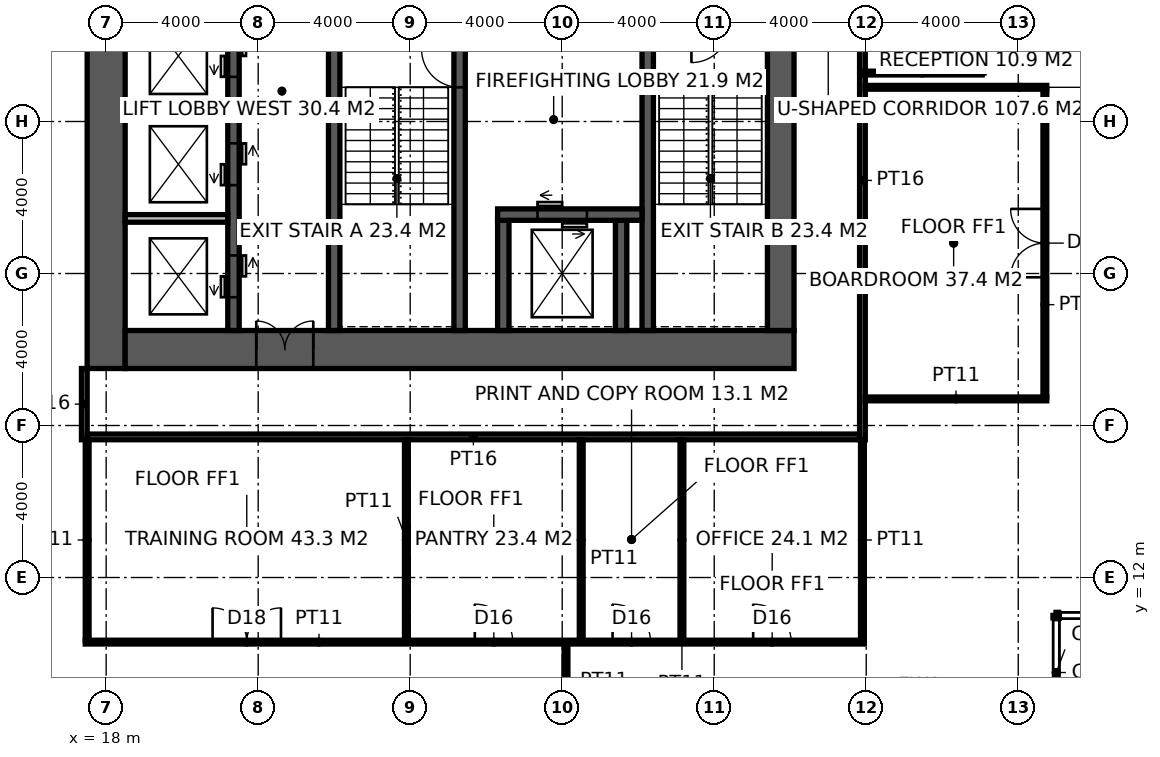
"""IFC4 building model, lengths in metres.
Left out: names, types, materials, properties, quantities, classifications, styles, units other than length and angle.
Written with IfcOpenShell. Run it as: python <this file> out.ifc"""

import sys

from ifc_helpers import new_model, si_unit, direction, frame, frame_2d, origin, place, context, subcontext, project, spatial, rectangle, extrude, element, fill, save


model = new_model("IFC4")
c1 = context("Model", 3, precision=1e-05, world=origin(), true_north=direction((0.0, 1.0)))
c2 = subcontext(c1, "Body", "Model", "MODEL_VIEW")
j1 = project(units=[si_unit("LENGTHUNIT", "METRE"), si_unit("PLANEANGLEUNIT", "RADIAN")], contexts=[c1])
p1 = place(None, origin())
s1 = spatial("IfcSite", under=j1, at=p1, CompositionType="ELEMENT")
p2 = place(p1, origin())
s2 = spatial("IfcBuilding", under=s1, at=p2, CompositionType="ELEMENT")
p3 = place(p2, frame((0.0, 0.0, 199.8)))
s3 = spatial("IfcBuildingStorey", under=s2, at=p3, CompositionType="ELEMENT", Elevation=199.8)
p4 = place(p3, frame((18.0, 17.5, -0.15), z_axis=(0.0, 0.0, 1.0), x_axis=(0.0, 1.0, 0.0)))
e1 = element("IfcWall", 1, at=p4, inside=s3, PredefinedType="SHEAR", context=c2, shape_type="SweptSolid", body=[
    extrude(rectangle(XDim=19.0, YDim=1.0, at=frame_2d((9.5, 0.0))), origin(), (0.0, 0.0, 1.0), 4.0),
])
p5 = place(p3, frame((18.5, 18.0, -0.15), z_axis=(0.0, 0.0, 1.0), x_axis=(1.0, 0.0, 0.0)))
e2 = element("IfcWall", 2, at=p5, inside=s3, PredefinedType="SHEAR", context=c2, shape_type="SweptSolid", body=[
    extrude(rectangle(XDim=17.6, YDim=1.0, at=frame_2d((8.8, 0.0))), origin(), (0.0, 0.0, 1.0), 4.0),
])
p6 = place(p5, frame((3.45, 0.0, 0.15)))
e3 = element("IfcOpeningElement", 3, at=p6, cuts=e2, PredefinedType="OPENING", context=c2, shape_type="SweptSolid", body=[
    extrude(rectangle(XDim=1.5, YDim=2.4, at=frame_2d((0.75, 1.2))), frame((0.0, 0.51, 0.0), z_axis=(0.0, -1.0, 0.0), x_axis=(1.0, 0.0, 0.0)), (0.0, 0.0, 1.0), 1.02),
])
p7 = place(p3, frame((35.75, 18.5, -0.15), z_axis=(0.0, 0.0, 1.0), x_axis=(0.0, 1.0, 0.0)))
e4 = element("IfcWall", 4, at=p7, inside=s3, PredefinedType="SHEAR", context=c2, shape_type="SweptSolid", body=[
    extrude(rectangle(XDim=17.0, YDim=0.7, at=frame_2d((8.5, 0.0))), origin(), (0.0, 0.0, 1.0), 4.0),
])
p8 = place(p7, frame((9.85, 0.0, 0.15)))
e5 = element("IfcOpeningElement", 5, at=p8, cuts=e4, PredefinedType="OPENING", context=c2, shape_type="SweptSolid", body=[
    extrude(rectangle(XDim=1.0, YDim=2.2, at=frame_2d((0.5, 1.1))), frame((0.0, 0.36, 0.0), z_axis=(0.0, -1.0, 0.0), x_axis=(1.0, 0.0, 0.0)), (0.0, 0.0, 1.0), 0.72),
])
p9 = place(p3, frame((24.0, 18.5, -0.15), z_axis=(0.0, 0.0, 1.0), x_axis=(0.0, 1.0, 0.0)))
e6 = element("IfcWall", 6, at=p9, inside=s3, PredefinedType="SHEAR", context=c2, shape_type="SweptSolid", body=[
    extrude(rectangle(XDim=17.0, YDim=0.3, at=frame_2d((8.5, 0.0))), origin(), (0.0, 0.0, 1.0), 4.0),
])
p10 = place(p9, frame((9.6, 0.0, 0.15)))
e7 = element("IfcOpeningElement", 7, at=p10, cuts=e6, PredefinedType="OPENING", context=c2, shape_type="SweptSolid", body=[
    extrude(rectangle(XDim=1.5, YDim=2.4, at=frame_2d((0.75, 1.2))), frame((0.0, 0.16, 0.0), z_axis=(0.0, -1.0, 0.0), x_axis=(1.0, 0.0, 0.0)), (0.0, 0.0, 1.0), 0.32),
])
p11 = place(p3, frame((27.3, 18.5, -0.15), z_axis=(0.0, 0.0, 1.0), x_axis=(0.0, 1.0, 0.0)))
e8 = element("IfcWall", 8, at=p11, inside=s3, PredefinedType="SHEAR", context=c2, shape_type="SweptSolid", body=[
    extrude(rectangle(XDim=7.9, YDim=0.3, at=frame_2d((3.95, 0.0))), origin(), (0.0, 0.0, 1.0), 4.0),
])
p12 = place(p11, frame((6.4, 0.0, 0.15)))
e9 = element("IfcOpeningElement", 9, at=p12, cuts=e8, PredefinedType="OPENING", context=c2, shape_type="SweptSolid", body=[
    extrude(rectangle(XDim=1.0, YDim=2.2, at=frame_2d((0.5, 1.1))), frame((0.0, 0.16, 0.0), z_axis=(0.0, -1.0, 0.0), x_axis=(1.0, 0.0, 0.0)), (0.0, 0.0, 1.0), 0.32),
])
p13 = place(p3, frame((32.25, 18.5, -0.15), z_axis=(0.0, 0.0, 1.0), x_axis=(0.0, 1.0, 0.0)))
e10 = element("IfcWall", 10, at=p13, inside=s3, PredefinedType="SHEAR", context=c2, shape_type="SweptSolid", body=[
    extrude(rectangle(XDim=7.9, YDim=0.3, at=frame_2d((3.95, 0.0))), origin(), (0.0, 0.0, 1.0), 4.0),
])
for number, where, z_axis, x_axis in (
    (11, (28.45, 18.5, -0.15), (0.0, 0.0, 1.0), (0.0, 1.0, 0.0)),
    (12, (31.55, 18.5, -0.15), (0.0, 0.0, 1.0), (0.0, 1.0, 0.0)),
):
    element("IfcWall", number, at=place(p3, frame(where, z_axis=z_axis, x_axis=x_axis)), inside=s3, PredefinedType="SHEAR", context=c2, shape_type="SweptSolid", body=[
        extrude(rectangle(XDim=2.9, YDim=0.3, at=frame_2d((1.45, 0.0))), origin(), (0.0, 0.0, 1.0), 4.0),
    ])
p14 = place(p3, frame((28.3, 21.55, -0.15), z_axis=(0.0, 0.0, 1.0), x_axis=(1.0, 0.0, 0.0)))
e13 = element("IfcWall", 13, at=p14, inside=s3, PredefinedType="SHEAR", context=c2, shape_type="SweptSolid", body=[
    extrude(rectangle(XDim=3.8, YDim=0.3, at=frame_2d((1.9, 0.0))), origin(), (0.0, 0.0, 1.0), 4.0),
])
p15 = place(p14, frame((1.05, 0.0, 0.15)))
e14 = element("IfcOpeningElement", 14, at=p15, cuts=e13, PredefinedType="OPENING", context=c2, shape_type="SweptSolid", body=[
    extrude(rectangle(XDim=1.3, YDim=2.4, at=frame_2d((0.65, 1.2))), frame((0.0, 0.16, 0.0), z_axis=(0.0, -1.0, 0.0), x_axis=(1.0, 0.0, 0.0)), (0.0, 0.0, 1.0), 0.32),
])
p16 = place(p3, frame((21.35, 18.5, -0.15), z_axis=(0.0, 0.0, 1.0), x_axis=(0.0, 1.0, 0.0)))
e15 = element("IfcWall", 15, at=p16, inside=s3, PredefinedType="SHEAR", context=c2, shape_type="SweptSolid", body=[
    extrude(rectangle(XDim=12.5, YDim=0.3, at=frame_2d((6.25, 0.0))), origin(), (0.0, 0.0, 1.0), 4.0),
])
p17 = place(p16, frame((0.875, 0.0, 0.15)))
e16 = element("IfcOpeningElement", 16, at=p17, cuts=e15, PredefinedType="OPENING", context=c2, shape_type="SweptSolid", body=[
    extrude(rectangle(XDim=1.1, YDim=2.2, at=frame_2d((0.55, 1.1))), frame((0.0, 0.16, 0.0), z_axis=(0.0, -1.0, 0.0), x_axis=(1.0, 0.0, 0.0)), (0.0, 0.0, 1.0), 0.32),
])
p18 = place(p16, frame((3.825, 0.0, 0.15)))
e17 = element("IfcOpeningElement", 17, at=p18, cuts=e15, PredefinedType="OPENING", context=c2, shape_type="SweptSolid", body=[
    extrude(rectangle(XDim=1.1, YDim=2.2, at=frame_2d((0.55, 1.1))), frame((0.0, 0.16, 0.0), z_axis=(0.0, -1.0, 0.0), x_axis=(1.0, 0.0, 0.0)), (0.0, 0.0, 1.0), 0.32),
])
p19 = place(p16, frame((6.675, 0.0, 0.15)))
e18 = element("IfcOpeningElement", 18, at=p19, cuts=e15, PredefinedType="OPENING", context=c2, shape_type="SweptSolid", body=[
    extrude(rectangle(XDim=1.1, YDim=2.2, at=frame_2d((0.55, 1.1))), frame((0.0, 0.16, 0.0), z_axis=(0.0, -1.0, 0.0), x_axis=(1.0, 0.0, 0.0)), (0.0, 0.0, 1.0), 0.32),
])
p20 = place(p16, frame((9.575, 0.0, 0.15)))
e19 = element("IfcOpeningElement", 19, at=p20, cuts=e15, PredefinedType="OPENING", context=c2, shape_type="SweptSolid", body=[
    extrude(rectangle(XDim=1.1, YDim=2.2, at=frame_2d((0.55, 1.1))), frame((0.0, 0.16, 0.0), z_axis=(0.0, -1.0, 0.0), x_axis=(1.0, 0.0, 0.0)), (0.0, 0.0, 1.0), 0.32),
])
for number, where, z_axis, x_axis in (
    (20, (18.5, 21.45, -0.15), (0.0, 0.0, 1.0), (1.0, 0.0, 0.0)),
    (21, (18.5, 24.3, -0.15), (0.0, 0.0, 1.0), (1.0, 0.0, 0.0)),
):
    element("IfcWall", number, at=place(p3, frame(where, z_axis=z_axis, x_axis=x_axis)), inside=s3, PredefinedType="SOLIDWALL", context=c2, shape_type="SweptSolid", body=[
        extrude(rectangle(XDim=2.7, YDim=0.2, at=frame_2d((1.35, 0.0))), origin(), (0.0, 0.0, 1.0), 4.0),
    ])
p21 = place(p3, frame((17.425, 15.625, 0.0), z_axis=(0.0, 0.0, 1.0), x_axis=(0.0, 1.0, 0.0)))
e22 = element("IfcWall", 22, at=p21, inside=s3, PredefinedType="PARTITIONING", context=c2, shape_type="SweptSolid", body=[
    extrude(rectangle(XDim=1.875, YDim=0.15, at=frame_2d((0.938, 0.0))), origin(), (0.0, 0.0, 1.0), 3.85),
])
p22 = place(p3, frame((37.9, 15.625, 0.0), z_axis=(0.0, 0.0, 1.0), x_axis=(0.0, 1.0, 0.0)))
e23 = element("IfcWall", 23, at=p22, inside=s3, PredefinedType="PARTITIONING", context=c2, shape_type="SweptSolid", body=[
    extrude(rectangle(XDim=22.75, YDim=0.15, at=frame_2d((11.375, 0.0))), origin(), (0.0, 0.0, 1.0), 2.85),
])
p23 = place(p22, frame((10.475, 0.0, 0.0)))
e24 = element("IfcOpeningElement", 24, at=p23, cuts=e23, PredefinedType="OPENING", context=c2, shape_type="SweptSolid", body=[
    extrude(rectangle(XDim=1.8, YDim=2.4, at=frame_2d((0.9, 1.2))), frame((0.0, 0.085, 0.0), z_axis=(0.0, -1.0, 0.0), x_axis=(1.0, 0.0, 0.0)), (0.0, 0.0, 1.0), 0.17),
])
p24 = place(p3, frame((17.5, 15.7, 0.0), z_axis=(0.0, 0.0, 1.0), x_axis=(1.0, 0.0, 0.0)))
e25 = element("IfcWall", 25, at=p24, inside=s3, PredefinedType="PARTITIONING", context=c2, shape_type="SweptSolid", body=[
    extrude(rectangle(XDim=20.325, YDim=0.15, at=frame_2d((10.163, 0.0))), origin(), (0.0, 0.0, 1.0), 3.85),
])
p25 = place(p3, frame((17.45, 10.3, 0.0), z_axis=(0.0, 0.0, 1.0), x_axis=(1.0, 0.0, 0.0)))
e26 = element("IfcWall", 26, at=p25, inside=s3, PredefinedType="PARTITIONING", context=c2, shape_type="SweptSolid", body=[
    extrude(rectangle(XDim=20.5, YDim=0.1, at=frame_2d((10.25, 0.0))), origin(), (0.0, 0.0, 1.0), 3.85),
])
p26 = place(p25, frame((3.35, 0.0, 0.0)))
e27 = element("IfcOpeningElement", 27, at=p26, cuts=e26, PredefinedType="OPENING", context=c2, shape_type="SweptSolid", body=[
    extrude(rectangle(XDim=1.8, YDim=2.4, at=frame_2d((0.9, 1.2))), frame((0.0, 0.06, 0.0), z_axis=(0.0, -1.0, 0.0), x_axis=(1.0, 0.0, 0.0)), (0.0, 0.0, 1.0), 0.12),
])
p27 = place(p25, frame((10.25, 0.0, 0.0)))
e28 = element("IfcOpeningElement", 28, at=p27, cuts=e26, PredefinedType="OPENING", context=c2, shape_type="SweptSolid", body=[
    extrude(rectangle(XDim=1.0, YDim=2.2, at=frame_2d((0.5, 1.1))), frame((0.0, 0.06, 0.0), z_axis=(0.0, -1.0, 0.0), x_axis=(1.0, 0.0, 0.0)), (0.0, 0.0, 1.0), 0.12),
])
p28 = place(p25, frame((13.875, 0.0, 0.0)))
e29 = element("IfcOpeningElement", 29, at=p28, cuts=e26, PredefinedType="OPENING", context=c2, shape_type="SweptSolid", body=[
    extrude(rectangle(XDim=1.0, YDim=2.2, at=frame_2d((0.5, 1.1))), frame((0.0, 0.06, 0.0), z_axis=(0.0, -1.0, 0.0), x_axis=(1.0, 0.0, 0.0)), (0.0, 0.0, 1.0), 0.12),
])
p29 = place(p25, frame((17.575, 0.0, 0.0)))
e30 = element("IfcOpeningElement", 30, at=p29, cuts=e26, PredefinedType="OPENING", context=c2, shape_type="SweptSolid", body=[
    extrude(rectangle(XDim=1.0, YDim=2.2, at=frame_2d((0.5, 1.1))), frame((0.0, 0.06, 0.0), z_axis=(0.0, -1.0, 0.0), x_axis=(1.0, 0.0, 0.0)), (0.0, 0.0, 1.0), 0.12),
])
for number, where, z_axis, x_axis in (
    (31, (37.975, 16.7, 0.0), (0.0, 0.0, 1.0), (1.0, 0.0, 0.0)),
    (32, (37.975, 24.9, 0.0), (0.0, 0.0, 1.0), (1.0, 0.0, 0.0)),
):
    element("IfcWall", number, at=place(p3, frame(where, z_axis=z_axis, x_axis=x_axis)), inside=s3, PredefinedType="PARTITIONING", context=c2, shape_type="SweptSolid", body=[
        extrude(rectangle(XDim=4.775, YDim=0.1, at=frame_2d((2.387, 0.0))), origin(), (0.0, 0.0, 1.0), 3.85),
    ])
p30 = place(p3, frame((17.5, 10.35, 0.0), z_axis=(0.0, 0.0, 1.0), x_axis=(0.0, 1.0, 0.0)))
e33 = element("IfcWall", 33, at=p30, inside=s3, PredefinedType="PARTITIONING", context=c2, shape_type="SweptSolid", body=[
    extrude(rectangle(XDim=5.275, YDim=0.1, at=frame_2d((2.637, 0.0))), origin(), (0.0, 0.0, 1.0), 3.85),
])
for number, where, z_axis, x_axis in (
    (34, (25.9, 10.35, 0.0), (0.0, 0.0, 1.0), (0.0, 1.0, 0.0)),
    (35, (30.5, 10.35, 0.0), (0.0, 0.0, 1.0), (0.0, 1.0, 0.0)),
):
    element("IfcWall", number, at=place(p3, frame(where, z_axis=z_axis, x_axis=x_axis)), inside=s3, PredefinedType="PARTITIONING", context=c2, shape_type="SweptSolid", body=[
        extrude(rectangle(XDim=5.275, YDim=0.1, at=frame_2d((2.637, 0.0))), origin(), (0.0, 0.0, 1.0), 2.65),
    ])
p31 = place(p3, frame((33.15, 10.35, 0.0), z_axis=(0.0, 0.0, 1.0), x_axis=(0.0, 1.0, 0.0)))
e36 = element("IfcWall", 36, at=p31, inside=s3, PredefinedType="PARTITIONING", context=c2, shape_type="SweptSolid", body=[
    extrude(rectangle(XDim=5.275, YDim=0.1, at=frame_2d((2.637, 0.0))), origin(), (0.0, 0.0, 1.0), 3.85),
])
p32 = place(p3, frame((37.9, 10.35, 0.0), z_axis=(0.0, 0.0, 1.0), x_axis=(0.0, 1.0, 0.0)))
e37 = element("IfcWall", 37, at=p32, inside=s3, PredefinedType="PARTITIONING", context=c2, shape_type="SweptSolid", body=[
    extrude(rectangle(XDim=5.275, YDim=0.1, at=frame_2d((2.637, 0.0))), origin(), (0.0, 0.0, 1.0), 2.95),
])
p33 = place(p3, frame((42.7, 16.75, 0.0), z_axis=(0.0, 0.0, 1.0), x_axis=(0.0, 1.0, 0.0)))
e38 = element("IfcWall", 38, at=p33, inside=s3, PredefinedType="PARTITIONING", context=c2, shape_type="SweptSolid", body=[
    extrude(rectangle(XDim=8.1, YDim=0.1, at=frame_2d((4.05, 0.0))), origin(), (0.0, 0.0, 1.0), 3.85),
])
p34 = place(p33, frame((3.15, 0.0, 0.0)))
e39 = element("IfcOpeningElement", 39, at=p34, cuts=e38, PredefinedType="OPENING", context=c2, shape_type="SweptSolid", body=[
    extrude(rectangle(XDim=1.8, YDim=2.4, at=frame_2d((0.9, 1.2))), frame((0.0, 0.06, 0.0), z_axis=(0.0, -1.0, 0.0), x_axis=(1.0, 0.0, 0.0)), (0.0, 0.0, 1.0), 0.12),
])
p35 = place(p3, frame((30.1, 10.25, 0.0), z_axis=(0.0, 0.0, 1.0), x_axis=(0.0, -1.0, 0.0)))
e40 = element("IfcWall", 40, at=p35, inside=s3, PredefinedType="PARTITIONING", context=c2, shape_type="SweptSolid", body=[
    extrude(rectangle(XDim=1.95, YDim=0.1, at=frame_2d((0.975, 0.0))), origin(), (0.0, 0.0, 1.0), 2.65),
])
p36 = place(p3, frame((37.9, 25.275, 0.0), z_axis=(0.0, 0.0, 1.0), x_axis=(1.0, 0.0, 0.0)))
e41 = element("IfcWall", 41, at=p36, inside=s3, PredefinedType="PARTITIONING", context=c2, shape_type="SweptSolid", body=[
    extrude(rectangle(XDim=3.15, YDim=0.1, at=frame_2d((1.575, 0.0))), origin(), (0.0, 0.0, 1.0), 3.85),
])
p37 = place(p3, frame((41.05, 25.275, 0.0), z_axis=(0.0, 0.0, 1.0), x_axis=(0.0, 1.0, 0.0)))
e42 = element("IfcWall", 42, at=p37, inside=s3, PredefinedType="PARTITIONING", context=c2, shape_type="SweptSolid", body=[
    extrude(rectangle(XDim=3.45, YDim=0.1, at=frame_2d((1.725, 0.0))), origin(), (0.0, 0.0, 1.0), 3.85),
])
p38 = place(p37, frame((1.225, 0.0, 0.0)))
e43 = element("IfcOpeningElement", 43, at=p38, cuts=e42, PredefinedType="OPENING", context=c2, shape_type="SweptSolid", body=[
    extrude(rectangle(XDim=1.0, YDim=2.2, at=frame_2d((0.5, 1.1))), frame((0.0, 0.06, 0.0), z_axis=(0.0, -1.0, 0.0), x_axis=(1.0, 0.0, 0.0)), (0.0, 0.0, 1.0), 0.12),
])
p39 = place(p12, origin())
e44 = element("IfcDoor", 44, at=p39, inside=s3, OperationType="SINGLE_SWING_RIGHT", PredefinedType="DOOR", context=c2, shape_type="SweptSolid", body=[
    extrude(rectangle(XDim=1.0, YDim=2.2, at=frame_2d((0.5, 1.1))), frame((0.0, 0.025, 0.0), z_axis=(0.0, -1.0, 0.0), x_axis=(1.0, 0.0, 0.0)), (0.0, 0.0, 1.0), 0.05),
])
fill(e9, e44)
p40 = place(p6, origin())
e45 = element("IfcDoor", 45, at=p40, inside=s3, OperationType="DOUBLE_DOOR_DOUBLE_SWING", PredefinedType="DOOR", context=c2, shape_type="SweptSolid", body=[
    extrude(rectangle(XDim=1.5, YDim=2.4, at=frame_2d((0.75, 1.2))), frame((0.0, 0.025, 0.0), z_axis=(0.0, -1.0, 0.0), x_axis=(1.0, 0.0, 0.0)), (0.0, 0.0, 1.0), 0.05),
])
fill(e3, e45)
p41 = place(p26, origin())
e46 = element("IfcDoor", 46, at=p41, inside=s3, OperationType="DOUBLE_DOOR_DOUBLE_SWING", PredefinedType="DOOR", context=c2, shape_type="SweptSolid", body=[
    extrude(rectangle(XDim=1.8, YDim=2.4, at=frame_2d((0.9, 1.2))), frame((0.0, 0.025, 0.0), z_axis=(0.0, -1.0, 0.0), x_axis=(1.0, 0.0, 0.0)), (0.0, 0.0, 1.0), 0.05),
])
fill(e27, e46)
p42 = place(p27, origin())
e47 = element("IfcDoor", 47, at=p42, inside=s3, OperationType="SINGLE_SWING_LEFT", PredefinedType="DOOR", context=c2, shape_type="SweptSolid", body=[
    extrude(rectangle(XDim=1.0, YDim=2.2, at=frame_2d((0.5, 1.1))), frame((0.0, 0.025, 0.0), z_axis=(0.0, -1.0, 0.0), x_axis=(1.0, 0.0, 0.0)), (0.0, 0.0, 1.0), 0.05),
])
fill(e28, e47)
p43 = place(p28, origin())
e48 = element("IfcDoor", 48, at=p43, inside=s3, OperationType="SINGLE_SWING_LEFT", PredefinedType="DOOR", context=c2, shape_type="SweptSolid", body=[
    extrude(rectangle(XDim=1.0, YDim=2.2, at=frame_2d((0.5, 1.1))), frame((0.0, 0.025, 0.0), z_axis=(0.0, -1.0, 0.0), x_axis=(1.0, 0.0, 0.0)), (0.0, 0.0, 1.0), 0.05),
])
fill(e29, e48)
p44 = place(p29, origin())
e49 = element("IfcDoor", 49, at=p44, inside=s3, OperationType="SINGLE_SWING_LEFT", PredefinedType="DOOR", context=c2, shape_type="SweptSolid", body=[
    extrude(rectangle(XDim=1.0, YDim=2.2, at=frame_2d((0.5, 1.1))), frame((0.0, 0.025, 0.0), z_axis=(0.0, -1.0, 0.0), x_axis=(1.0, 0.0, 0.0)), (0.0, 0.0, 1.0), 0.05),
])
fill(e30, e49)
p45 = place(p34, origin())
e50 = element("IfcDoor", 50, at=p45, inside=s3, OperationType="DOUBLE_DOOR_DOUBLE_SWING", PredefinedType="DOOR", context=c2, shape_type="SweptSolid", body=[
    extrude(rectangle(XDim=1.8, YDim=2.4, at=frame_2d((0.9, 1.2))), frame((0.0, 0.025, 0.0), z_axis=(0.0, -1.0, 0.0), x_axis=(1.0, 0.0, 0.0)), (0.0, 0.0, 1.0), 0.05),
])
fill(e39, e50)
p46 = place(p15, origin())
e51 = element("IfcDoor", 51, at=p46, inside=s3, OperationType="DOUBLE_DOOR_SLIDING", PredefinedType="DOOR", context=c2, shape_type="SweptSolid", body=[
    extrude(rectangle(XDim=1.3, YDim=2.4, at=frame_2d((0.65, 1.2))), frame((0.0, 0.025, 0.0), z_axis=(0.0, -1.0, 0.0), x_axis=(1.0, 0.0, 0.0)), (0.0, 0.0, 1.0), 0.05),
])
fill(e14, e51)
p47 = place(p17, origin())
e52 = element("IfcDoor", 52, at=p47, inside=s3, OperationType="DOUBLE_DOOR_SLIDING", PredefinedType="DOOR", context=c2, shape_type="SweptSolid", body=[
    extrude(rectangle(XDim=1.1, YDim=2.2, at=frame_2d((0.55, 1.1))), frame((0.0, 0.025, 0.0), z_axis=(0.0, -1.0, 0.0), x_axis=(1.0, 0.0, 0.0)), (0.0, 0.0, 1.0), 0.05),
])
fill(e16, e52)
p48 = place(p18, origin())
e53 = element("IfcDoor", 53, at=p48, inside=s3, OperationType="DOUBLE_DOOR_SLIDING", PredefinedType="DOOR", context=c2, shape_type="SweptSolid", body=[
    extrude(rectangle(XDim=1.1, YDim=2.2, at=frame_2d((0.55, 1.1))), frame((0.0, 0.025, 0.0), z_axis=(0.0, -1.0, 0.0), x_axis=(1.0, 0.0, 0.0)), (0.0, 0.0, 1.0), 0.05),
])
fill(e17, e53)
p49 = place(p19, origin())
e54 = element("IfcDoor", 54, at=p49, inside=s3, OperationType="DOUBLE_DOOR_SLIDING", PredefinedType="DOOR", context=c2, shape_type="SweptSolid", body=[
    extrude(rectangle(XDim=1.1, YDim=2.2, at=frame_2d((0.55, 1.1))), frame((0.0, 0.025, 0.0), z_axis=(0.0, -1.0, 0.0), x_axis=(1.0, 0.0, 0.0)), (0.0, 0.0, 1.0), 0.05),
])
fill(e18, e54)
save(model, sys.argv[1])
